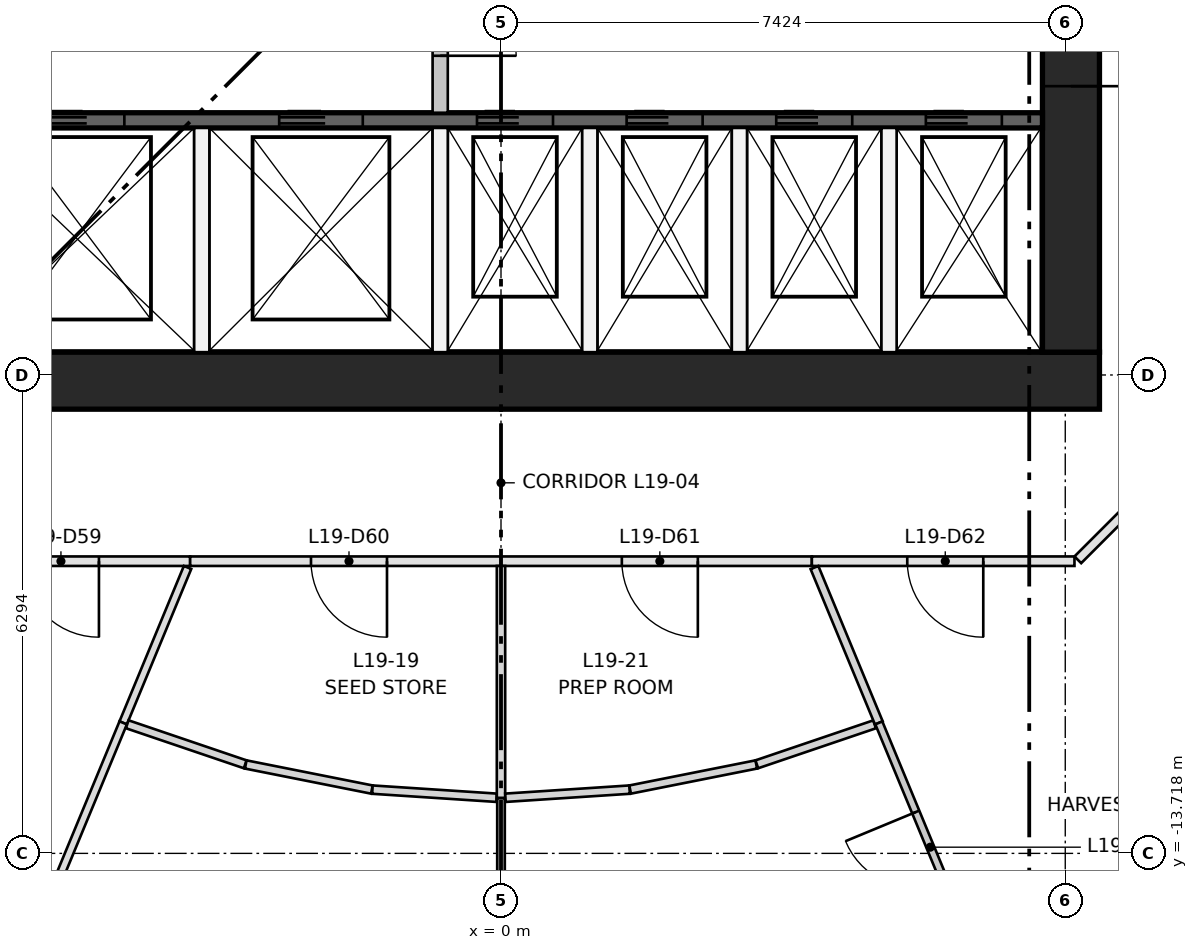
"""IFC4 building model, lengths in metres.
Left out: names, types, materials, properties, quantities, classifications, styles, units other than length and angle.
Written with IfcOpenShell. Run it as: python <this file> out.ifc"""

import sys

from ifc_helpers import new_model, si_unit, direction, frame, frame_2d, origin, place, context, subcontext, project, spatial, rectangle, extrude, element, fill, save


model = new_model("IFC4")
c1 = context("Model", 3, precision=1e-05, world=origin(), true_north=direction((0.0, 1.0)))
c2 = subcontext(c1, "Body", "Model", "MODEL_VIEW")
j1 = project(units=[si_unit("LENGTHUNIT", "METRE"), si_unit("PLANEANGLEUNIT", "RADIAN")], contexts=[c1])
p1 = place(None, origin())
s1 = spatial("IfcSite", under=j1, at=p1, CompositionType="ELEMENT")
p2 = place(p1, origin())
s2 = spatial("IfcBuilding", under=s1, at=p2, CompositionType="ELEMENT")
p3 = place(p2, frame((0.0, 0.0, 76.4)))
s3 = spatial("IfcBuildingStorey", under=s2, at=p3, CompositionType="ELEMENT", Elevation=76.4)
p4 = place(p3, frame((-7.874, -7.499, 0.0), z_axis=(0.0, 0.0, 1.0), x_axis=(1.0, 0.0, 0.0)))
e1 = element("IfcWall", 1, at=p4, inside=s3, PredefinedType="SHEAR", context=c2, shape_type="SweptSolid", body=[
    extrude(rectangle(XDim=15.748, YDim=0.75, at=frame_2d((7.874, 0.0))), origin(), (0.0, 0.0, 1.0), 3.65),
])
p5 = place(p3, frame((7.499, -7.124, 0.0), z_axis=(0.0, 0.0, 1.0), x_axis=(0.0, 1.0, 0.0)))
e2 = element("IfcWall", 2, at=p5, inside=s3, PredefinedType="SHEAR", context=c2, shape_type="SweptSolid", body=[
    extrude(rectangle(XDim=14.248, YDim=0.75, at=frame_2d((7.124, 0.0))), origin(), (0.0, 0.0, 1.0), 3.65),
])
p6 = place(p5, frame((6.624, 0.0, 0.0)))
e3 = element("IfcOpeningElement", 3, at=p6, cuts=e2, PredefinedType="OPENING", context=c2, shape_type="SweptSolid", body=[
    extrude(rectangle(XDim=1.0, YDim=2.1, at=frame_2d((0.5, 1.05))), frame((0.0, 0.385, 0.0), z_axis=(0.0, -1.0, 0.0), x_axis=(1.0, 0.0, 0.0)), (0.0, 0.0, 1.0), 0.77),
])
p7 = place(p5, frame((3.5, 0.0, 0.0)))
e4 = element("IfcOpeningElement", 4, at=p7, cuts=e2, PredefinedType="OPENING", context=c2, shape_type="SweptSolid", body=[
    extrude(rectangle(XDim=1.8, YDim=2.1, at=frame_2d((0.9, 1.05))), frame((0.0, 0.385, 0.0), z_axis=(0.0, -1.0, 0.0), x_axis=(1.0, 0.0, 0.0)), (0.0, 0.0, 1.0), 0.77),
])
p8 = place(p5, frame((8.948, 0.0, 0.0)))
e5 = element("IfcOpeningElement", 5, at=p8, cuts=e2, PredefinedType="OPENING", context=c2, shape_type="SweptSolid", body=[
    extrude(rectangle(XDim=1.8, YDim=2.1, at=frame_2d((0.9, 1.05))), frame((0.0, 0.385, 0.0), z_axis=(0.0, -1.0, 0.0), x_axis=(1.0, 0.0, 0.0)), (0.0, 0.0, 1.0), 0.77),
])
p9 = place(p3, frame((-7.124, -4.074, 0.0), z_axis=(0.0, 0.0, 1.0), x_axis=(1.0, 0.0, 0.0)))
e6 = element("IfcWall", 6, at=p9, inside=s3, PredefinedType="SHEAR", context=c2, shape_type="SweptSolid", body=[
    extrude(rectangle(XDim=14.248, YDim=0.2, at=frame_2d((7.124, 0.0))), origin(), (0.0, 0.0, 1.0), 3.3),
])
p10 = place(p9, frame((1.069, 0.0, 0.0)))
e7 = element("IfcOpeningElement", 7, at=p10, cuts=e6, PredefinedType="OPENING", context=c2, shape_type="SweptSolid", body=[
    extrude(rectangle(XDim=1.1, YDim=2.1, at=frame_2d((0.55, 1.05))), frame((0.0, 0.11, 0.0), z_axis=(0.0, -1.0, 0.0), x_axis=(1.0, 0.0, 0.0)), (0.0, 0.0, 1.0), 0.22),
])
p11 = place(p9, frame((4.206, 0.0, 0.0)))
e8 = element("IfcOpeningElement", 8, at=p11, cuts=e6, PredefinedType="OPENING", context=c2, shape_type="SweptSolid", body=[
    extrude(rectangle(XDim=1.1, YDim=2.1, at=frame_2d((0.55, 1.05))), frame((0.0, 0.11, 0.0), z_axis=(0.0, -1.0, 0.0), x_axis=(1.0, 0.0, 0.0)), (0.0, 0.0, 1.0), 0.22),
])
p12 = place(p9, frame((6.808, 0.0, 0.0)))
e9 = element("IfcOpeningElement", 9, at=p12, cuts=e6, PredefinedType="OPENING", context=c2, shape_type="SweptSolid", body=[
    extrude(rectangle(XDim=1.0, YDim=2.1, at=frame_2d((0.5, 1.05))), frame((0.0, 0.11, 0.0), z_axis=(0.0, -1.0, 0.0), x_axis=(1.0, 0.0, 0.0)), (0.0, 0.0, 1.0), 0.22),
])
p13 = place(p9, frame((8.777, 0.0, 0.0)))
e10 = element("IfcOpeningElement", 10, at=p13, cuts=e6, PredefinedType="OPENING", context=c2, shape_type="SweptSolid", body=[
    extrude(rectangle(XDim=1.0, YDim=2.1, at=frame_2d((0.5, 1.05))), frame((0.0, 0.11, 0.0), z_axis=(0.0, -1.0, 0.0), x_axis=(1.0, 0.0, 0.0)), (0.0, 0.0, 1.0), 0.22),
])
p14 = place(p9, frame((10.745, 0.0, 0.0)))
e11 = element("IfcOpeningElement", 11, at=p14, cuts=e6, PredefinedType="OPENING", context=c2, shape_type="SweptSolid", body=[
    extrude(rectangle(XDim=1.0, YDim=2.1, at=frame_2d((0.5, 1.05))), frame((0.0, 0.11, 0.0), z_axis=(0.0, -1.0, 0.0), x_axis=(1.0, 0.0, 0.0)), (0.0, 0.0, 1.0), 0.22),
])
p15 = place(p9, frame((12.714, 0.0, 0.0)))
e12 = element("IfcOpeningElement", 12, at=p15, cuts=e6, PredefinedType="OPENING", context=c2, shape_type="SweptSolid", body=[
    extrude(rectangle(XDim=1.0, YDim=2.1, at=frame_2d((0.5, 1.05))), frame((0.0, 0.11, 0.0), z_axis=(0.0, -1.0, 0.0), x_axis=(1.0, 0.0, 0.0)), (0.0, 0.0, 1.0), 0.22),
])
for number, where, z_axis, x_axis in (
    (13, (-3.937, -7.124, 0.0), (0.0, 0.0, 1.0), (0.0, 1.0, 0.0)),
    (14, (-0.8, -7.124, 0.0), (0.0, 0.0, 1.0), (0.0, 1.0, 0.0)),
):
    element("IfcWall", number, at=place(p3, frame(where, z_axis=z_axis, x_axis=x_axis)), inside=s3, PredefinedType="PARTITIONING", context=c2, shape_type="SweptSolid", body=[
        extrude(rectangle(XDim=2.95, YDim=0.2, at=frame_2d((1.475, 0.0))), origin(), (0.0, 0.0, 1.0), 3.3),
    ])
p16 = place(p3, frame((-0.8, -3.974, 0.0), z_axis=(0.0, 0.0, 1.0), x_axis=(0.0, 1.0, 0.0)))
e15 = element("IfcWall", 15, at=p16, inside=s3, PredefinedType="PARTITIONING", context=c2, shape_type="SweptSolid", body=[
    extrude(rectangle(XDim=2.499, YDim=0.2, at=frame_2d((1.25, 0.0))), origin(), (0.0, 0.0, 1.0), 3.3),
])
p17 = place(p16, frame((0.75, 0.0, 0.0)))
e16 = element("IfcOpeningElement", 16, at=p17, cuts=e15, PredefinedType="OPENING", context=c2, shape_type="SweptSolid", body=[
    extrude(rectangle(XDim=1.0, YDim=2.1, at=frame_2d((0.5, 1.05))), frame((0.0, 0.11, 0.0), z_axis=(0.0, -1.0, 0.0), x_axis=(1.0, 0.0, 0.0)), (0.0, 0.0, 1.0), 0.22),
])
for number, where, z_axis, x_axis in (
    (17, (1.168, -7.124, 0.0), (0.0, 0.0, 1.0), (0.0, 1.0, 0.0)),
    (18, (3.137, -7.124, 0.0), (0.0, 0.0, 1.0), (0.0, 1.0, 0.0)),
    (19, (5.105, -7.124, 0.0), (0.0, 0.0, 1.0), (0.0, 1.0, 0.0)),
):
    element("IfcWall", number, at=place(p3, frame(where, z_axis=z_axis, x_axis=x_axis)), inside=s3, PredefinedType="PARTITIONING", context=c2, shape_type="SweptSolid", body=[
        extrude(rectangle(XDim=2.95, YDim=0.2, at=frame_2d((1.475, 0.0))), origin(), (0.0, 0.0, 1.0), 3.3),
    ])
p18 = place(p3, frame((-4.09, -9.874, 0.0), z_axis=(0.0, 0.0, 1.0), x_axis=(-1.0, 0.0, 0.0)))
e20 = element("IfcWall", 20, at=p18, inside=s3, PredefinedType="PARTITIONING", context=c2, shape_type="SweptSolid", body=[
    extrude(rectangle(XDim=3.455, YDim=0.125, at=frame_2d((1.728, 0.0))), origin(), (0.0, 0.0, 1.0), 3.3),
])
p19 = place(p18, frame((1.2, 0.0, 0.0)))
e21 = element("IfcOpeningElement", 21, at=p19, cuts=e20, PredefinedType="OPENING", context=c2, shape_type="SweptSolid", body=[
    extrude(rectangle(XDim=1.0, YDim=2.1, at=frame_2d((0.5, 1.05))), frame((0.0, 0.073, 0.0), z_axis=(0.0, -1.0, 0.0), x_axis=(1.0, 0.0, 0.0)), (0.0, 0.0, 1.0), 0.145),
])
p20 = place(p3, frame((0.0, -9.874, 0.0), z_axis=(0.0, 0.0, 1.0), x_axis=(-1.0, 0.0, 0.0)))
e22 = element("IfcWall", 22, at=p20, inside=s3, PredefinedType="PARTITIONING", context=c2, shape_type="SweptSolid", body=[
    extrude(rectangle(XDim=4.09, YDim=0.125, at=frame_2d((2.045, 0.0))), origin(), (0.0, 0.0, 1.0), 3.3),
])
p21 = place(p20, frame((1.5, 0.0, 0.0)))
e23 = element("IfcOpeningElement", 23, at=p21, cuts=e22, PredefinedType="OPENING", context=c2, shape_type="SweptSolid", body=[
    extrude(rectangle(XDim=1.0, YDim=2.1, at=frame_2d((0.5, 1.05))), frame((0.0, 0.073, 0.0), z_axis=(0.0, -1.0, 0.0), x_axis=(1.0, 0.0, 0.0)), (0.0, 0.0, 1.0), 0.145),
])
p22 = place(p3, frame((4.09, -9.874, 0.0), z_axis=(0.0, 0.0, 1.0), x_axis=(-1.0, 0.0, 0.0)))
e24 = element("IfcWall", 24, at=p22, inside=s3, PredefinedType="PARTITIONING", context=c2, shape_type="SweptSolid", body=[
    extrude(rectangle(XDim=4.09, YDim=0.125, at=frame_2d((2.045, 0.0))), origin(), (0.0, 0.0, 1.0), 3.3),
])
p23 = place(p22, frame((1.5, 0.0, 0.0)))
e25 = element("IfcOpeningElement", 25, at=p23, cuts=e24, PredefinedType="OPENING", context=c2, shape_type="SweptSolid", body=[
    extrude(rectangle(XDim=1.0, YDim=2.1, at=frame_2d((0.5, 1.05))), frame((0.0, 0.073, 0.0), z_axis=(0.0, -1.0, 0.0), x_axis=(1.0, 0.0, 0.0)), (0.0, 0.0, 1.0), 0.145),
])
p24 = place(p3, frame((7.545, -9.874, 0.0), z_axis=(0.0, 0.0, 1.0), x_axis=(-1.0, 0.0, 0.0)))
e26 = element("IfcWall", 26, at=p24, inside=s3, PredefinedType="PARTITIONING", context=c2, shape_type="SweptSolid", body=[
    extrude(rectangle(XDim=3.455, YDim=0.125, at=frame_2d((1.728, 0.0))), origin(), (0.0, 0.0, 1.0), 3.3),
])
p25 = place(p24, frame((1.2, 0.0, 0.0)))
e27 = element("IfcOpeningElement", 27, at=p25, cuts=e26, PredefinedType="OPENING", context=c2, shape_type="SweptSolid", body=[
    extrude(rectangle(XDim=1.0, YDim=2.1, at=frame_2d((0.5, 1.05))), frame((0.0, 0.073, 0.0), z_axis=(0.0, -1.0, 0.0), x_axis=(1.0, 0.0, 0.0)), (0.0, 0.0, 1.0), 0.145),
])
p26 = place(p3, frame((8.722, -8.722, 0.0), z_axis=(0.0, 0.0, 1.0), x_axis=(-0.707030604857, -0.70718294931, 0.0)))
e28 = element("IfcWall", 28, at=p26, inside=s3, PredefinedType="PARTITIONING", context=c2, shape_type="SweptSolid", body=[
    extrude(rectangle(XDim=1.603, YDim=0.125, at=frame_2d((0.801, 0.0))), origin(), (0.0, 0.0, 1.0), 3.3),
])
p27 = place(p3, frame((-4.124, -9.957, 0.0), z_axis=(0.0, 0.0, 1.0), x_axis=(-0.382679799248, -0.923881037389, 0.0)))
e29 = element("IfcWall", 29, at=p27, inside=s3, PredefinedType="PARTITIONING", context=c2, shape_type="SweptSolid", body=[
    extrude(rectangle(XDim=2.213, YDim=0.105, at=frame_2d((1.106, 0.0))), origin(), (0.0, 0.0, 1.0), 3.3),
])
p28 = place(p3, frame((-4.971, -12.001, 0.0), z_axis=(0.0, 0.0, 1.0), x_axis=(-0.382696833945, -0.923873981281, 0.0)))
e30 = element("IfcWall", 30, at=p28, inside=s3, PredefinedType="PARTITIONING", context=c2, shape_type="SweptSolid", body=[
    extrude(rectangle(XDim=5.27, YDim=0.105, at=frame_2d((2.635, 0.0))), origin(), (0.0, 0.0, 1.0), 3.3),
])
p29 = place(p3, frame((-3.365, -12.546, 0.0), z_axis=(0.0, 0.0, 1.0), x_axis=(-0.946941470356, 0.321406054267, 0.0)))
e31 = element("IfcWall", 31, at=p29, inside=s3, PredefinedType="PARTITIONING", context=c2, shape_type="SweptSolid", body=[
    extrude(rectangle(XDim=1.639, YDim=0.11, at=frame_2d((0.82, 0.0))), origin(), (0.0, 0.0, 1.0), 3.3),
])
p30 = place(p3, frame((-1.699, -12.878, 0.0), z_axis=(0.0, 0.0, 1.0), x_axis=(-0.98079097439, 0.19506169423, 0.0)))
e32 = element("IfcWall", 32, at=p30, inside=s3, PredefinedType="PARTITIONING", context=c2, shape_type="SweptSolid", body=[
    extrude(rectangle(XDim=1.692, YDim=0.11, at=frame_2d((0.846, 0.0))), origin(), (0.0, 0.0, 1.0), 3.3),
])
p31 = place(p3, frame((-0.059, -12.986, 0.0), z_axis=(0.0, 0.0, 1.0), x_axis=(-0.997863649312, 0.065330983318, 0.0)))
e33 = element("IfcWall", 33, at=p31, inside=s3, PredefinedType="PARTITIONING", context=c2, shape_type="SweptSolid", body=[
    extrude(rectangle(XDim=1.637, YDim=0.11, at=frame_2d((0.818, 0.0))), origin(), (0.0, 0.0, 1.0), 3.3),
])
p32 = place(p3, frame((0.0, -9.937, 0.0), z_axis=(0.0, 0.0, 1.0), x_axis=(0.0, -1.0, 0.0)))
e34 = element("IfcWall", 34, at=p32, inside=s3, PredefinedType="PARTITIONING", context=c2, shape_type="SweptSolid", body=[
    extrude(rectangle(XDim=3.053, YDim=0.11, at=frame_2d((1.527, 0.0))), origin(), (0.0, 0.0, 1.0), 3.3),
])
p33 = place(p3, frame((0.0, -18.26, 0.0), z_axis=(0.0, 0.0, 1.0), x_axis=(0.0, 1.0, 0.0)))
e35 = element("IfcWall", 35, at=p33, inside=s3, PredefinedType="PARTITIONING", context=c2, shape_type="SweptSolid", body=[
    extrude(rectangle(XDim=5.27, YDim=0.1, at=frame_2d((2.635, 0.0))), origin(), (0.0, 0.0, 1.0), 3.3),
])
p34 = place(p33, frame((3.0, 0.0, 0.0)))
e36 = element("IfcOpeningElement", 36, at=p34, cuts=e35, PredefinedType="OPENING", context=c2, shape_type="SweptSolid", body=[
    extrude(rectangle(XDim=1.0, YDim=2.1, at=frame_2d((0.5, 1.05))), frame((0.0, 0.06, 0.0), z_axis=(0.0, -1.0, 0.0), x_axis=(1.0, 0.0, 0.0)), (0.0, 0.0, 1.0), 0.12),
])
p35 = place(p3, frame((1.692, -12.879, 0.0), z_axis=(0.0, 0.0, 1.0), x_axis=(-0.997863649312, -0.065330983318, 0.0)))
e37 = element("IfcWall", 37, at=p35, inside=s3, PredefinedType="PARTITIONING", context=c2, shape_type="SweptSolid", body=[
    extrude(rectangle(XDim=1.637, YDim=0.11, at=frame_2d((0.818, 0.0))), origin(), (0.0, 0.0, 1.0), 3.3),
])
p36 = place(p3, frame((3.359, -12.548, 0.0), z_axis=(0.0, 0.0, 1.0), x_axis=(-0.98079097439, -0.19506169423, 0.0)))
e38 = element("IfcWall", 38, at=p36, inside=s3, PredefinedType="PARTITIONING", context=c2, shape_type="SweptSolid", body=[
    extrude(rectangle(XDim=1.692, YDim=0.11, at=frame_2d((0.846, 0.0))), origin(), (0.0, 0.0, 1.0), 3.3),
])
p37 = place(p3, frame((4.915, -12.02, 0.0), z_axis=(0.0, 0.0, 1.0), x_axis=(-0.946923574546, -0.321458774913, 0.0)))
e39 = element("IfcWall", 39, at=p37, inside=s3, PredefinedType="PARTITIONING", context=c2, shape_type="SweptSolid", body=[
    extrude(rectangle(XDim=1.637, YDim=0.11, at=frame_2d((0.818, 0.0))), origin(), (0.0, 0.0, 1.0), 3.3),
])
p38 = place(p3, frame((4.125, -9.958, 0.0), z_axis=(0.0, 0.0, 1.0), x_axis=(0.382647470997, -0.923894427378, 0.0)))
e40 = element("IfcWall", 40, at=p38, inside=s3, PredefinedType="PARTITIONING", context=c2, shape_type="SweptSolid", body=[
    extrude(rectangle(XDim=2.212, YDim=0.11, at=frame_2d((1.106, 0.0))), origin(), (0.0, 0.0, 1.0), 3.3),
])
p39 = place(p3, frame((6.988, -16.87, 0.0), z_axis=(0.0, 0.0, 1.0), x_axis=(-0.382657291887, 0.923890359819, 0.0)))
e41 = element("IfcWall", 41, at=p39, inside=s3, PredefinedType="PARTITIONING", context=c2, shape_type="SweptSolid", body=[
    extrude(rectangle(XDim=5.27, YDim=0.1, at=frame_2d((2.635, 0.0))), origin(), (0.0, 0.0, 1.0), 3.3),
])
p40 = place(p39, frame((3.0, 0.0, 0.0)))
e42 = element("IfcOpeningElement", 42, at=p40, cuts=e41, PredefinedType="OPENING", context=c2, shape_type="SweptSolid", body=[
    extrude(rectangle(XDim=1.0, YDim=2.1, at=frame_2d((0.5, 1.05))), frame((0.0, 0.06, 0.0), z_axis=(0.0, -1.0, 0.0), x_axis=(1.0, 0.0, 0.0)), (0.0, 0.0, 1.0), 0.12),
])
p41 = place(p10, origin())
e43 = element("IfcDoor", 43, at=p41, inside=s3, OperationType="DOUBLE_DOOR_SLIDING", PredefinedType="DOOR", context=c2, shape_type="SweptSolid", body=[
    extrude(rectangle(XDim=1.1, YDim=2.1, at=frame_2d((0.55, 1.05))), frame((0.0, 0.025, 0.0), z_axis=(0.0, -1.0, 0.0), x_axis=(1.0, 0.0, 0.0)), (0.0, 0.0, 1.0), 0.05),
])
fill(e7, e43)
p42 = place(p11, origin())
e44 = element("IfcDoor", 44, at=p42, inside=s3, OperationType="DOUBLE_DOOR_SLIDING", PredefinedType="DOOR", context=c2, shape_type="SweptSolid", body=[
    extrude(rectangle(XDim=1.1, YDim=2.1, at=frame_2d((0.55, 1.05))), frame((0.0, 0.025, 0.0), z_axis=(0.0, -1.0, 0.0), x_axis=(1.0, 0.0, 0.0)), (0.0, 0.0, 1.0), 0.05),
])
fill(e8, e44)
p43 = place(p12, origin())
e45 = element("IfcDoor", 45, at=p43, inside=s3, OperationType="DOUBLE_DOOR_SLIDING", PredefinedType="DOOR", context=c2, shape_type="SweptSolid", body=[
    extrude(rectangle(XDim=1.0, YDim=2.1, at=frame_2d((0.5, 1.05))), frame((0.0, 0.025, 0.0), z_axis=(0.0, -1.0, 0.0), x_axis=(1.0, 0.0, 0.0)), (0.0, 0.0, 1.0), 0.05),
])
fill(e9, e45)
p44 = place(p13, origin())
e46 = element("IfcDoor", 46, at=p44, inside=s3, OperationType="DOUBLE_DOOR_SLIDING", PredefinedType="DOOR", context=c2, shape_type="SweptSolid", body=[
    extrude(rectangle(XDim=1.0, YDim=2.1, at=frame_2d((0.5, 1.05))), frame((0.0, 0.025, 0.0), z_axis=(0.0, -1.0, 0.0), x_axis=(1.0, 0.0, 0.0)), (0.0, 0.0, 1.0), 0.05),
])
fill(e10, e46)
p45 = place(p14, origin())
e47 = element("IfcDoor", 47, at=p45, inside=s3, OperationType="DOUBLE_DOOR_SLIDING", PredefinedType="DOOR", context=c2, shape_type="SweptSolid", body=[
    extrude(rectangle(XDim=1.0, YDim=2.1, at=frame_2d((0.5, 1.05))), frame((0.0, 0.025, 0.0), z_axis=(0.0, -1.0, 0.0), x_axis=(1.0, 0.0, 0.0)), (0.0, 0.0, 1.0), 0.05),
])
fill(e11, e47)
p46 = place(p15, origin())
e48 = element("IfcDoor", 48, at=p46, inside=s3, OperationType="DOUBLE_DOOR_SLIDING", PredefinedType="DOOR", context=c2, shape_type="SweptSolid", body=[
    extrude(rectangle(XDim=1.0, YDim=2.1, at=frame_2d((0.5, 1.05))), frame((0.0, 0.025, 0.0), z_axis=(0.0, -1.0, 0.0), x_axis=(1.0, 0.0, 0.0)), (0.0, 0.0, 1.0), 0.05),
])
fill(e12, e48)
p47 = place(p17, frame((1.0, 0.0, 0.0), z_axis=(0.0, 0.0, 1.0), x_axis=(-1.0, 0.0, 0.0)))
e49 = element("IfcDoor", 49, at=p47, inside=s3, OperationType="SINGLE_SWING_LEFT", PredefinedType="DOOR", context=c2, shape_type="SweptSolid", body=[
    extrude(rectangle(XDim=1.0, YDim=2.1, at=frame_2d((0.5, 1.05))), frame((0.0, 0.025, 0.0), z_axis=(0.0, -1.0, 0.0), x_axis=(1.0, 0.0, 0.0)), (0.0, 0.0, 1.0), 0.05),
])
fill(e16, e49)
p48 = place(p7, frame((1.8, 0.0, 0.0), z_axis=(0.0, 0.0, 1.0), x_axis=(-1.0, 0.0, 0.0)))
e50 = element("IfcDoor", 50, at=p48, inside=s3, OperationType="DOUBLE_DOOR_SINGLE_SWING", PredefinedType="DOOR", context=c2, shape_type="SweptSolid", body=[
    extrude(rectangle(XDim=1.8, YDim=2.1, at=frame_2d((0.9, 1.05))), frame((0.0, 0.025, 0.0), z_axis=(0.0, -1.0, 0.0), x_axis=(1.0, 0.0, 0.0)), (0.0, 0.0, 1.0), 0.05),
])
fill(e4, e50)
p49 = place(p19, origin())
e51 = element("IfcDoor", 51, at=p49, inside=s3, OperationType="SINGLE_SWING_LEFT", PredefinedType="DOOR", context=c2, shape_type="SweptSolid", body=[
    extrude(rectangle(XDim=1.0, YDim=2.1, at=frame_2d((0.5, 1.05))), frame((0.0, 0.025, 0.0), z_axis=(0.0, -1.0, 0.0), x_axis=(1.0, 0.0, 0.0)), (0.0, 0.0, 1.0), 0.05),
])
fill(e21, e51)
p50 = place(p21, origin())
e52 = element("IfcDoor", 52, at=p50, inside=s3, OperationType="SINGLE_SWING_LEFT", PredefinedType="DOOR", context=c2, shape_type="SweptSolid", body=[
    extrude(rectangle(XDim=1.0, YDim=2.1, at=frame_2d((0.5, 1.05))), frame((0.0, 0.025, 0.0), z_axis=(0.0, -1.0, 0.0), x_axis=(1.0, 0.0, 0.0)), (0.0, 0.0, 1.0), 0.05),
])
fill(e23, e52)
p51 = place(p23, origin())
e53 = element("IfcDoor", 53, at=p51, inside=s3, OperationType="SINGLE_SWING_LEFT", PredefinedType="DOOR", context=c2, shape_type="SweptSolid", body=[
    extrude(rectangle(XDim=1.0, YDim=2.1, at=frame_2d((0.5, 1.05))), frame((0.0, 0.025, 0.0), z_axis=(0.0, -1.0, 0.0), x_axis=(1.0, 0.0, 0.0)), (0.0, 0.0, 1.0), 0.05),
])
fill(e25, e53)
p52 = place(p25, origin())
e54 = element("IfcDoor", 54, at=p52, inside=s3, OperationType="SINGLE_SWING_LEFT", PredefinedType="DOOR", context=c2, shape_type="SweptSolid", body=[
    extrude(rectangle(XDim=1.0, YDim=2.1, at=frame_2d((0.5, 1.05))), frame((0.0, 0.025, 0.0), z_axis=(0.0, -1.0, 0.0), x_axis=(1.0, 0.0, 0.0)), (0.0, 0.0, 1.0), 0.05),
])
fill(e27, e54)
p53 = place(p40, origin())
e55 = element("IfcDoor", 55, at=p53, inside=s3, OperationType="SINGLE_SWING_RIGHT", PredefinedType="DOOR", context=c2, shape_type="SweptSolid", body=[
    extrude(rectangle(XDim=1.0, YDim=2.1, at=frame_2d((0.5, 1.05))), frame((0.0, 0.025, 0.0), z_axis=(0.0, -1.0, 0.0), x_axis=(1.0, 0.0, 0.0)), (0.0, 0.0, 1.0), 0.05),
])
fill(e42, e55)
save(model, sys.argv[1])
